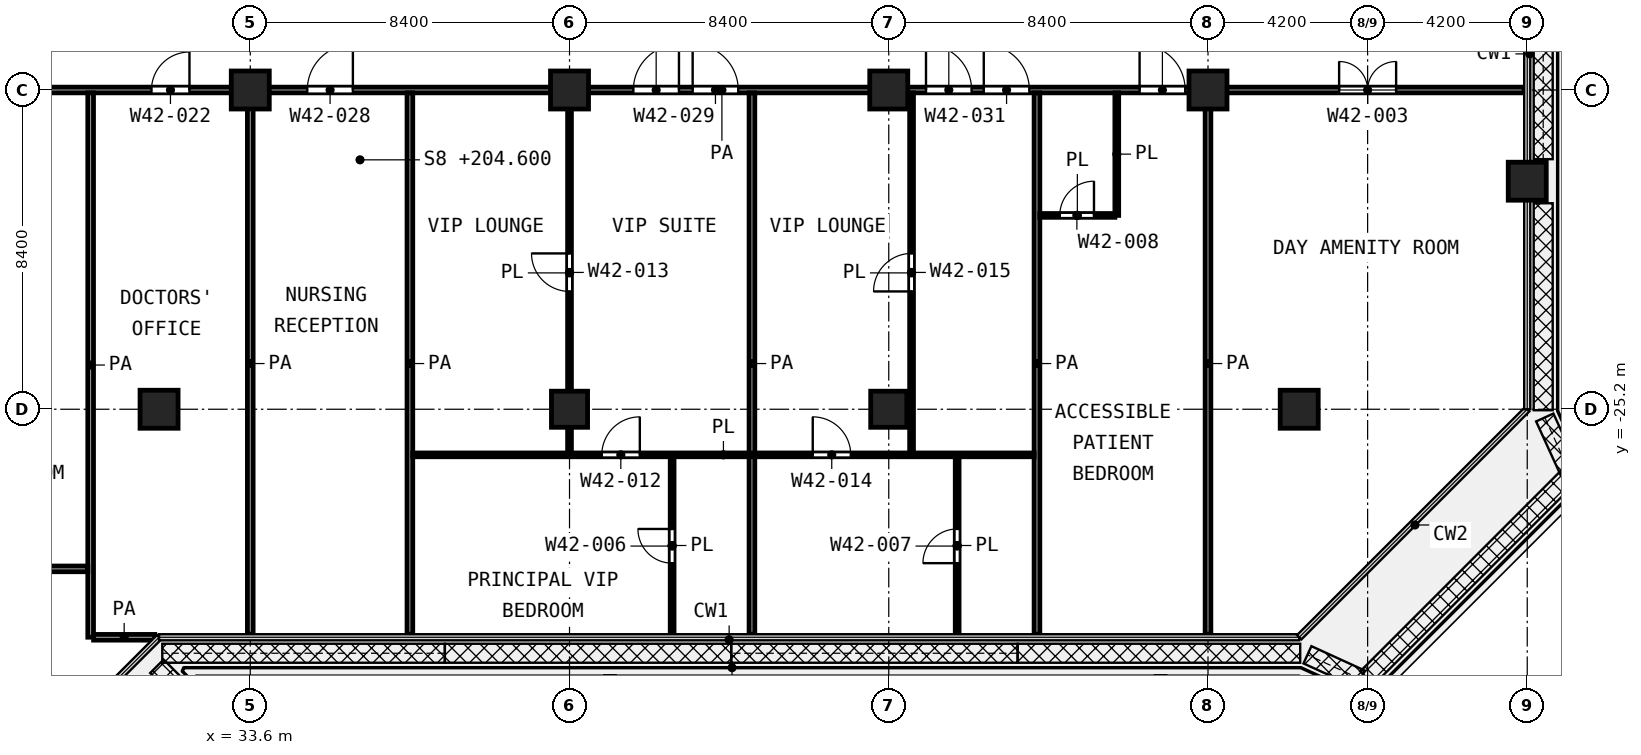
"""IFC4 building model, lengths in metres.
Left out: names, types, materials, properties, quantities, classifications, styles, units other than length and angle.
Written with IfcOpenShell. Run it as: python <this file> out.ifc"""

import sys

from ifc_helpers import new_model, si_unit, direction, frame, frame_2d, origin, origin_2d, place, context, subcontext, project, spatial, rectangle, extrude, element, fill, save


model = new_model("IFC4")
c1 = context("Model", 3, precision=1e-05, world=origin(), true_north=direction((0.0, 1.0)))
c2 = subcontext(c1, "Body", "Model", "MODEL_VIEW")
j1 = project(units=[si_unit("LENGTHUNIT", "METRE"), si_unit("PLANEANGLEUNIT", "RADIAN")], contexts=[c1])
p1 = place(None, origin())
s1 = spatial("IfcSite", under=j1, at=p1, CompositionType="ELEMENT")
p2 = place(p1, origin())
s2 = spatial("IfcBuilding", under=s1, at=p2, CompositionType="ELEMENT")
p3 = place(p2, frame((0.0, 0.0, 204.6)))
s3 = spatial("IfcBuildingStorey", under=s2, at=p3, CompositionType="ELEMENT", Elevation=204.6)
for number, where, z_axis, x_axis in (
    (1, (33.6, -16.8, 0.0), (0.0, 0.0, 1.0), (1.0, 0.0, 0.0)),
    (2, (42.0, -16.8, 0.0), (0.0, 0.0, 1.0), (1.0, 0.0, 0.0)),
    (3, (50.4, -16.8, 0.0), (0.0, 0.0, 1.0), (1.0, 0.0, 0.0)),
    (4, (58.8, -16.8, 0.0), (0.0, 0.0, 1.0), (1.0, 0.0, 0.0)),
    (5, (67.2, -19.2, 0.0), (0.0, 0.0, 1.0), (1.0, 0.0, 0.0)),
    (6, (31.2, -25.2, 0.0), (0.0, 0.0, 1.0), (1.0, 0.0, 0.0)),
):
    element("IfcColumn", number, at=place(p3, frame(where, z_axis=z_axis, x_axis=x_axis)), inside=s3, PredefinedType="COLUMN", context=c2, shape_type="SweptSolid", body=[
        extrude(rectangle(XDim=1.0, YDim=1.0, at=origin_2d()), origin(), (0.0, 0.0, 1.0), 4.2),
    ])
for number, where, z_axis, x_axis in (
    (7, (42.0, -25.2, 0.0), (0.0, 0.0, 1.0), (1.0, 0.0, 0.0)),
    (8, (50.4, -25.2, 0.0), (0.0, 0.0, 1.0), (1.0, 0.0, 0.0)),
):
    element("IfcColumn", number, at=place(p3, frame(where, z_axis=z_axis, x_axis=x_axis)), inside=s3, PredefinedType="COLUMN", context=c2, shape_type="SweptSolid", body=[
        extrude(rectangle(XDim=0.95, YDim=0.95, at=origin_2d()), origin(), (0.0, 0.0, 1.0), 4.2),
    ])
p4 = place(p3, frame((61.2, -25.2, 0.0), z_axis=(0.0, 0.0, 1.0), x_axis=(1.0, 0.0, 0.0)))
e9 = element("IfcColumn", 9, at=p4, inside=s3, PredefinedType="COLUMN", context=c2, shape_type="SweptSolid", body=[
    extrude(rectangle(XDim=1.0, YDim=1.0, at=origin_2d()), origin(), (0.0, 0.0, 1.0), 4.2),
])
p5 = place(p3, frame((37.875, -26.4, 0.0), z_axis=(0.0, 0.0, 1.0), x_axis=(1.0, 0.0, 0.0)))
e10 = element("IfcWall", 10, at=p5, inside=s3, PredefinedType="PARTITIONING", context=c2, shape_type="SweptSolid", body=[
    extrude(rectangle(XDim=16.35, YDim=0.1, at=frame_2d((8.175, 0.0))), origin(), (0.0, 0.0, 1.0), 3.6),
])
p6 = place(p5, frame((4.975, 0.0, 0.0)))
e11 = element("IfcOpeningElement", 11, at=p6, cuts=e10, PredefinedType="OPENING", context=c2, shape_type="SweptSolid", body=[
    extrude(rectangle(XDim=1.0, YDim=2.1, at=frame_2d((0.5, 1.05))), frame((0.0, 0.06, 0.0), z_axis=(0.0, -1.0, 0.0), x_axis=(1.0, 0.0, 0.0)), (0.0, 0.0, 1.0), 0.12),
])
p7 = place(p5, frame((10.525, 0.0, 0.0)))
e12 = element("IfcOpeningElement", 12, at=p7, cuts=e10, PredefinedType="OPENING", context=c2, shape_type="SweptSolid", body=[
    extrude(rectangle(XDim=1.0, YDim=2.1, at=frame_2d((0.5, 1.05))), frame((0.0, 0.06, 0.0), z_axis=(0.0, -1.0, 0.0), x_axis=(1.0, 0.0, 0.0)), (0.0, 0.0, 1.0), 0.12),
])
p8 = place(p3, frame((54.375, -20.1, 0.0), z_axis=(0.0, 0.0, 1.0), x_axis=(1.0, 0.0, 0.0)))
e13 = element("IfcWall", 13, at=p8, inside=s3, PredefinedType="PARTITIONING", context=c2, shape_type="SweptSolid", body=[
    extrude(rectangle(XDim=1.975, YDim=0.1, at=frame_2d((0.988, 0.0))), origin(), (0.0, 0.0, 1.0), 3.6),
])
p9 = place(p8, frame((0.525, 0.0, 0.0)))
e14 = element("IfcOpeningElement", 14, at=p9, cuts=e13, PredefinedType="OPENING", context=c2, shape_type="SweptSolid", body=[
    extrude(rectangle(XDim=0.9, YDim=2.1, at=frame_2d((0.45, 1.05))), frame((0.0, 0.06, 0.0), z_axis=(0.0, -1.0, 0.0), x_axis=(1.0, 0.0, 0.0)), (0.0, 0.0, 1.0), 0.12),
])
p10 = place(p3, frame((42.0, -26.35, 0.0), z_axis=(0.0, 0.0, 1.0), x_axis=(0.0, 1.0, 0.0)))
e15 = element("IfcWall", 15, at=p10, inside=s3, PredefinedType="PARTITIONING", context=c2, shape_type="SweptSolid", body=[
    extrude(rectangle(XDim=9.475, YDim=0.1, at=frame_2d((4.738, 0.0))), origin(), (0.0, 0.0, 1.0), 3.6),
])
p11 = place(p10, frame((4.25, 0.0, 0.0)))
e16 = element("IfcOpeningElement", 16, at=p11, cuts=e15, PredefinedType="OPENING", context=c2, shape_type="SweptSolid", body=[
    extrude(rectangle(XDim=1.0, YDim=2.1, at=frame_2d((0.5, 1.05))), frame((0.0, 0.06, 0.0), z_axis=(0.0, -1.0, 0.0), x_axis=(1.0, 0.0, 0.0)), (0.0, 0.0, 1.0), 0.12),
])
p12 = place(p3, frame((44.7, -31.12, 0.0), z_axis=(0.0, 0.0, 1.0), x_axis=(0.0, 1.0, 0.0)))
e17 = element("IfcWall", 17, at=p12, inside=s3, PredefinedType="PARTITIONING", context=c2, shape_type="SweptSolid", body=[
    extrude(rectangle(XDim=4.67, YDim=0.1, at=frame_2d((2.335, 0.0))), origin(), (0.0, 0.0, 1.0), 3.6),
])
p13 = place(p12, frame((1.87, 0.0, 0.0)))
e18 = element("IfcOpeningElement", 18, at=p13, cuts=e17, PredefinedType="OPENING", context=c2, shape_type="SweptSolid", body=[
    extrude(rectangle(XDim=0.9, YDim=2.1, at=frame_2d((0.45, 1.05))), frame((0.0, 0.06, 0.0), z_axis=(0.0, -1.0, 0.0), x_axis=(1.0, 0.0, 0.0)), (0.0, 0.0, 1.0), 0.12),
])
p14 = place(p3, frame((51.0, -26.35, 0.0), z_axis=(0.0, 0.0, 1.0), x_axis=(0.0, 1.0, 0.0)))
e19 = element("IfcWall", 19, at=p14, inside=s3, PredefinedType="PARTITIONING", context=c2, shape_type="SweptSolid", body=[
    extrude(rectangle(XDim=9.475, YDim=0.1, at=frame_2d((4.738, 0.0))), origin(), (0.0, 0.0, 1.0), 3.6),
])
p15 = place(p14, frame((4.25, 0.0, 0.0)))
e20 = element("IfcOpeningElement", 20, at=p15, cuts=e19, PredefinedType="OPENING", context=c2, shape_type="SweptSolid", body=[
    extrude(rectangle(XDim=1.0, YDim=2.1, at=frame_2d((0.5, 1.05))), frame((0.0, 0.06, 0.0), z_axis=(0.0, -1.0, 0.0), x_axis=(1.0, 0.0, 0.0)), (0.0, 0.0, 1.0), 0.12),
])
p16 = place(p3, frame((52.2, -31.12, 0.0), z_axis=(0.0, 0.0, 1.0), x_axis=(0.0, 1.0, 0.0)))
e21 = element("IfcWall", 21, at=p16, inside=s3, PredefinedType="PARTITIONING", context=c2, shape_type="SweptSolid", body=[
    extrude(rectangle(XDim=4.67, YDim=0.1, at=frame_2d((2.335, 0.0))), origin(), (0.0, 0.0, 1.0), 3.6),
])
p17 = place(p16, frame((1.87, 0.0, 0.0)))
e22 = element("IfcOpeningElement", 22, at=p17, cuts=e21, PredefinedType="OPENING", context=c2, shape_type="SweptSolid", body=[
    extrude(rectangle(XDim=0.9, YDim=2.1, at=frame_2d((0.45, 1.05))), frame((0.0, 0.06, 0.0), z_axis=(0.0, -1.0, 0.0), x_axis=(1.0, 0.0, 0.0)), (0.0, 0.0, 1.0), 0.12),
])
p18 = place(p3, frame((56.4, -20.1, 0.0), z_axis=(0.0, 0.0, 1.0), x_axis=(0.0, 1.0, 0.0)))
e23 = element("IfcWall", 23, at=p18, inside=s3, PredefinedType="PARTITIONING", context=c2, shape_type="SweptSolid", body=[
    extrude(rectangle(XDim=3.225, YDim=0.1, at=frame_2d((1.613, 0.0))), origin(), (0.0, 0.0, 1.0), 3.6),
])
p19 = place(p3, frame((29.477, -31.2, 0.0), z_axis=(0.0, 0.0, 1.0), x_axis=(1.0, 0.0, 0.0)))
e24 = element("IfcWall", 24, at=p19, inside=s3, PredefinedType="PARTITIONING", context=c2, shape_type="SweptSolid", body=[
    extrude(rectangle(XDim=1.61, YDim=0.15, at=frame_2d((0.805, 0.0))), origin(), (0.0, 0.0, 1.0), 3.6),
])
p20 = place(p3, frame((16.875, -29.4, 0.0), z_axis=(0.0, 0.0, 1.0), x_axis=(1.0, 0.0, 0.0)))
e25 = element("IfcWall", 25, at=p20, inside=s3, PredefinedType="PARTITIONING", context=c2, shape_type="SweptSolid", body=[
    extrude(rectangle(XDim=12.45, YDim=0.15, at=frame_2d((6.225, 0.0))), origin(), (0.0, 0.0, 1.0), 3.6),
])
p21 = place(p3, frame((24.9, -16.8, 0.0), z_axis=(0.0, 0.0, 1.0), x_axis=(1.0, 0.0, 0.0)))
e26 = element("IfcWall", 26, at=p21, inside=s3, PredefinedType="PARTITIONING", context=c2, shape_type="SweptSolid", body=[
    extrude(rectangle(XDim=42.22, YDim=0.15, at=frame_2d((21.11, 0.0))), origin(), (0.0, 0.0, 1.0), 3.6),
])
p22 = place(p21, frame((1.65, 0.0, 0.0)))
e27 = element("IfcOpeningElement", 27, at=p22, cuts=e26, PredefinedType="OPENING", context=c2, shape_type="SweptSolid", body=[
    extrude(rectangle(XDim=1.5, YDim=2.1, at=frame_2d((0.75, 1.05))), frame((0.0, 0.085, 0.0), z_axis=(0.0, -1.0, 0.0), x_axis=(1.0, 0.0, 0.0)), (0.0, 0.0, 1.0), 0.17),
])
p23 = place(p21, frame((6.1, 0.0, 0.0)))
e28 = element("IfcOpeningElement", 28, at=p23, cuts=e26, PredefinedType="OPENING", context=c2, shape_type="SweptSolid", body=[
    extrude(rectangle(XDim=1.0, YDim=2.1, at=frame_2d((0.5, 1.05))), frame((0.0, 0.085, 0.0), z_axis=(0.0, -1.0, 0.0), x_axis=(1.0, 0.0, 0.0)), (0.0, 0.0, 1.0), 0.17),
])
p24 = place(p21, frame((10.2, 0.0, 0.0)))
e29 = element("IfcOpeningElement", 29, at=p24, cuts=e26, PredefinedType="OPENING", context=c2, shape_type="SweptSolid", body=[
    extrude(rectangle(XDim=1.2, YDim=2.1, at=frame_2d((0.6, 1.05))), frame((0.0, 0.085, 0.0), z_axis=(0.0, -1.0, 0.0), x_axis=(1.0, 0.0, 0.0)), (0.0, 0.0, 1.0), 0.17),
])
p25 = place(p21, frame((20.34, 0.0, 0.0)))
e30 = element("IfcOpeningElement", 30, at=p25, cuts=e26, PredefinedType="OPENING", context=c2, shape_type="SweptSolid", body=[
    extrude(rectangle(XDim=1.2, YDim=2.1, at=frame_2d((0.6, 1.05))), frame((0.0, 0.085, 0.0), z_axis=(0.0, -1.0, 0.0), x_axis=(1.0, 0.0, 0.0)), (0.0, 0.0, 1.0), 0.17),
])
p26 = place(p21, frame((18.78, 0.0, 0.0)))
e31 = element("IfcOpeningElement", 31, at=p26, cuts=e26, PredefinedType="OPENING", context=c2, shape_type="SweptSolid", body=[
    extrude(rectangle(XDim=1.2, YDim=2.1, at=frame_2d((0.6, 1.05))), frame((0.0, 0.085, 0.0), z_axis=(0.0, -1.0, 0.0), x_axis=(1.0, 0.0, 0.0)), (0.0, 0.0, 1.0), 0.17),
])
p27 = place(p21, frame((28.0, 0.0, 0.0)))
e32 = element("IfcOpeningElement", 32, at=p27, cuts=e26, PredefinedType="OPENING", context=c2, shape_type="SweptSolid", body=[
    extrude(rectangle(XDim=1.2, YDim=2.1, at=frame_2d((0.6, 1.05))), frame((0.0, 0.085, 0.0), z_axis=(0.0, -1.0, 0.0), x_axis=(1.0, 0.0, 0.0)), (0.0, 0.0, 1.0), 0.17),
])
p28 = place(p21, frame((26.48, 0.0, 0.0)))
e33 = element("IfcOpeningElement", 33, at=p28, cuts=e26, PredefinedType="OPENING", context=c2, shape_type="SweptSolid", body=[
    extrude(rectangle(XDim=1.2, YDim=2.1, at=frame_2d((0.6, 1.05))), frame((0.0, 0.085, 0.0), z_axis=(0.0, -1.0, 0.0), x_axis=(1.0, 0.0, 0.0)), (0.0, 0.0, 1.0), 0.17),
])
p29 = place(p21, frame((32.1, 0.0, 0.0)))
e34 = element("IfcOpeningElement", 34, at=p29, cuts=e26, PredefinedType="OPENING", context=c2, shape_type="SweptSolid", body=[
    extrude(rectangle(XDim=1.2, YDim=2.1, at=frame_2d((0.6, 1.05))), frame((0.0, 0.085, 0.0), z_axis=(0.0, -1.0, 0.0), x_axis=(1.0, 0.0, 0.0)), (0.0, 0.0, 1.0), 0.17),
])
p30 = place(p21, frame((37.35, 0.0, 0.0)))
e35 = element("IfcOpeningElement", 35, at=p30, cuts=e26, PredefinedType="OPENING", context=c2, shape_type="SweptSolid", body=[
    extrude(rectangle(XDim=1.5, YDim=2.1, at=frame_2d((0.75, 1.05))), frame((0.0, 0.085, 0.0), z_axis=(0.0, -1.0, 0.0), x_axis=(1.0, 0.0, 0.0)), (0.0, 0.0, 1.0), 0.17),
])
p31 = place(p3, frame((29.4, -31.198, 0.0), z_axis=(0.0, 0.0, 1.0), x_axis=(0.0, 1.0, 0.0)))
e36 = element("IfcWall", 36, at=p31, inside=s3, PredefinedType="PARTITIONING", context=c2, shape_type="SweptSolid", body=[
    extrude(rectangle(XDim=14.323, YDim=0.15, at=frame_2d((7.162, 0.0))), origin(), (0.0, 0.0, 1.0), 3.6),
])
for number, where, z_axis, x_axis in (
    (37, (33.6, -31.12, 0.0), (0.0, 0.0, 1.0), (0.0, 1.0, 0.0)),
    (38, (37.8, -31.12, 0.0), (0.0, 0.0, 1.0), (0.0, 1.0, 0.0)),
    (39, (46.8, -31.12, 0.0), (0.0, 0.0, 1.0), (0.0, 1.0, 0.0)),
    (40, (54.3, -31.12, 0.0), (0.0, 0.0, 1.0), (0.0, 1.0, 0.0)),
    (41, (58.8, -31.12, 0.0), (0.0, 0.0, 1.0), (0.0, 1.0, 0.0)),
):
    element("IfcWall", number, at=place(p3, frame(where, z_axis=z_axis, x_axis=x_axis)), inside=s3, PredefinedType="PARTITIONING", context=c2, shape_type="SweptSolid", body=[
        extrude(rectangle(XDim=14.245, YDim=0.15, at=frame_2d((7.123, 0.0))), origin(), (0.0, 0.0, 1.0), 3.6),
    ])
p32 = place(p23, origin())
e42 = element("IfcDoor", 42, at=p32, inside=s3, OperationType="SINGLE_SWING_RIGHT", PredefinedType="DOOR", context=c2, shape_type="SweptSolid", body=[
    extrude(rectangle(XDim=1.0, YDim=2.1, at=frame_2d((0.5, 1.05))), frame((0.0, 0.025, 0.0), z_axis=(0.0, -1.0, 0.0), x_axis=(1.0, 0.0, 0.0)), (0.0, 0.0, 1.0), 0.05),
])
fill(e28, e42)
p33 = place(p24, origin())
e43 = element("IfcDoor", 43, at=p33, inside=s3, OperationType="SINGLE_SWING_RIGHT", PredefinedType="DOOR", context=c2, shape_type="SweptSolid", body=[
    extrude(rectangle(XDim=1.2, YDim=2.1, at=frame_2d((0.6, 1.05))), frame((0.0, 0.025, 0.0), z_axis=(0.0, -1.0, 0.0), x_axis=(1.0, 0.0, 0.0)), (0.0, 0.0, 1.0), 0.05),
])
fill(e29, e43)
p34 = place(p25, origin())
e44 = element("IfcDoor", 44, at=p34, inside=s3, OperationType="SINGLE_SWING_LEFT", PredefinedType="DOOR", context=c2, shape_type="SweptSolid", body=[
    extrude(rectangle(XDim=1.2, YDim=2.1, at=frame_2d((0.6, 1.05))), frame((0.0, 0.025, 0.0), z_axis=(0.0, -1.0, 0.0), x_axis=(1.0, 0.0, 0.0)), (0.0, 0.0, 1.0), 0.05),
])
fill(e30, e44)
p35 = place(p26, origin())
e45 = element("IfcDoor", 45, at=p35, inside=s3, OperationType="SINGLE_SWING_RIGHT", PredefinedType="DOOR", context=c2, shape_type="SweptSolid", body=[
    extrude(rectangle(XDim=1.2, YDim=2.1, at=frame_2d((0.6, 1.05))), frame((0.0, 0.025, 0.0), z_axis=(0.0, -1.0, 0.0), x_axis=(1.0, 0.0, 0.0)), (0.0, 0.0, 1.0), 0.05),
])
fill(e31, e45)
p36 = place(p6, origin())
e46 = element("IfcDoor", 46, at=p36, inside=s3, OperationType="SINGLE_SWING_RIGHT", PredefinedType="DOOR", context=c2, shape_type="SweptSolid", body=[
    extrude(rectangle(XDim=1.0, YDim=2.1, at=frame_2d((0.5, 1.05))), frame((0.0, 0.025, 0.0), z_axis=(0.0, -1.0, 0.0), x_axis=(1.0, 0.0, 0.0)), (0.0, 0.0, 1.0), 0.05),
])
fill(e11, e46)
p37 = place(p11, origin())
e47 = element("IfcDoor", 47, at=p37, inside=s3, OperationType="SINGLE_SWING_RIGHT", PredefinedType="DOOR", context=c2, shape_type="SweptSolid", body=[
    extrude(rectangle(XDim=1.0, YDim=2.1, at=frame_2d((0.5, 1.05))), frame((0.0, 0.025, 0.0), z_axis=(0.0, -1.0, 0.0), x_axis=(1.0, 0.0, 0.0)), (0.0, 0.0, 1.0), 0.05),
])
fill(e16, e47)
p38 = place(p13, origin())
e48 = element("IfcDoor", 48, at=p38, inside=s3, OperationType="SINGLE_SWING_RIGHT", PredefinedType="DOOR", context=c2, shape_type="SweptSolid", body=[
    extrude(rectangle(XDim=0.9, YDim=2.1, at=frame_2d((0.45, 1.05))), frame((0.0, 0.025, 0.0), z_axis=(0.0, -1.0, 0.0), x_axis=(1.0, 0.0, 0.0)), (0.0, 0.0, 1.0), 0.05),
])
fill(e18, e48)
p39 = place(p27, origin())
e49 = element("IfcDoor", 49, at=p39, inside=s3, OperationType="SINGLE_SWING_LEFT", PredefinedType="DOOR", context=c2, shape_type="SweptSolid", body=[
    extrude(rectangle(XDim=1.2, YDim=2.1, at=frame_2d((0.6, 1.05))), frame((0.0, 0.025, 0.0), z_axis=(0.0, -1.0, 0.0), x_axis=(1.0, 0.0, 0.0)), (0.0, 0.0, 1.0), 0.05),
])
fill(e32, e49)
p40 = place(p28, origin())
e50 = element("IfcDoor", 50, at=p40, inside=s3, OperationType="SINGLE_SWING_LEFT", PredefinedType="DOOR", context=c2, shape_type="SweptSolid", body=[
    extrude(rectangle(XDim=1.2, YDim=2.1, at=frame_2d((0.6, 1.05))), frame((0.0, 0.025, 0.0), z_axis=(0.0, -1.0, 0.0), x_axis=(1.0, 0.0, 0.0)), (0.0, 0.0, 1.0), 0.05),
])
fill(e33, e50)
p41 = place(p7, origin())
e51 = element("IfcDoor", 51, at=p41, inside=s3, OperationType="SINGLE_SWING_LEFT", PredefinedType="DOOR", context=c2, shape_type="SweptSolid", body=[
    extrude(rectangle(XDim=1.0, YDim=2.1, at=frame_2d((0.5, 1.05))), frame((0.0, 0.025, 0.0), z_axis=(0.0, -1.0, 0.0), x_axis=(1.0, 0.0, 0.0)), (0.0, 0.0, 1.0), 0.05),
])
fill(e12, e51)
p42 = place(p15, origin())
e52 = element("IfcDoor", 52, at=p42, inside=s3, OperationType="SINGLE_SWING_LEFT", PredefinedType="DOOR", context=c2, shape_type="SweptSolid", body=[
    extrude(rectangle(XDim=1.0, YDim=2.1, at=frame_2d((0.5, 1.05))), frame((0.0, 0.025, 0.0), z_axis=(0.0, -1.0, 0.0), x_axis=(1.0, 0.0, 0.0)), (0.0, 0.0, 1.0), 0.05),
])
fill(e20, e52)
p43 = place(p17, origin())
e53 = element("IfcDoor", 53, at=p43, inside=s3, OperationType="SINGLE_SWING_LEFT", PredefinedType="DOOR", context=c2, shape_type="SweptSolid", body=[
    extrude(rectangle(XDim=0.9, YDim=2.1, at=frame_2d((0.45, 1.05))), frame((0.0, 0.025, 0.0), z_axis=(0.0, -1.0, 0.0), x_axis=(1.0, 0.0, 0.0)), (0.0, 0.0, 1.0), 0.05),
])
fill(e22, e53)
p44 = place(p29, origin())
e54 = element("IfcDoor", 54, at=p44, inside=s3, OperationType="SINGLE_SWING_LEFT", PredefinedType="DOOR", context=c2, shape_type="SweptSolid", body=[
    extrude(rectangle(XDim=1.2, YDim=2.1, at=frame_2d((0.6, 1.05))), frame((0.0, 0.025, 0.0), z_axis=(0.0, -1.0, 0.0), x_axis=(1.0, 0.0, 0.0)), (0.0, 0.0, 1.0), 0.05),
])
fill(e34, e54)
p45 = place(p9, origin())
e55 = element("IfcDoor", 55, at=p45, inside=s3, OperationType="SINGLE_SWING_RIGHT", PredefinedType="DOOR", context=c2, shape_type="SweptSolid", body=[
    extrude(rectangle(XDim=0.9, YDim=2.1, at=frame_2d((0.45, 1.05))), frame((0.0, 0.025, 0.0), z_axis=(0.0, -1.0, 0.0), x_axis=(1.0, 0.0, 0.0)), (0.0, 0.0, 1.0), 0.05),
])
fill(e14, e55)
p46 = place(p30, origin())
e56 = element("IfcDoor", 56, at=p46, inside=s3, OperationType="DOUBLE_DOOR_SINGLE_SWING", PredefinedType="DOOR", context=c2, shape_type="SweptSolid", body=[
    extrude(rectangle(XDim=1.5, YDim=2.1, at=frame_2d((0.75, 1.05))), frame((0.0, 0.025, 0.0), z_axis=(0.0, -1.0, 0.0), x_axis=(1.0, 0.0, 0.0)), (0.0, 0.0, 1.0), 0.05),
])
fill(e35, e56)
save(model, sys.argv[1])
